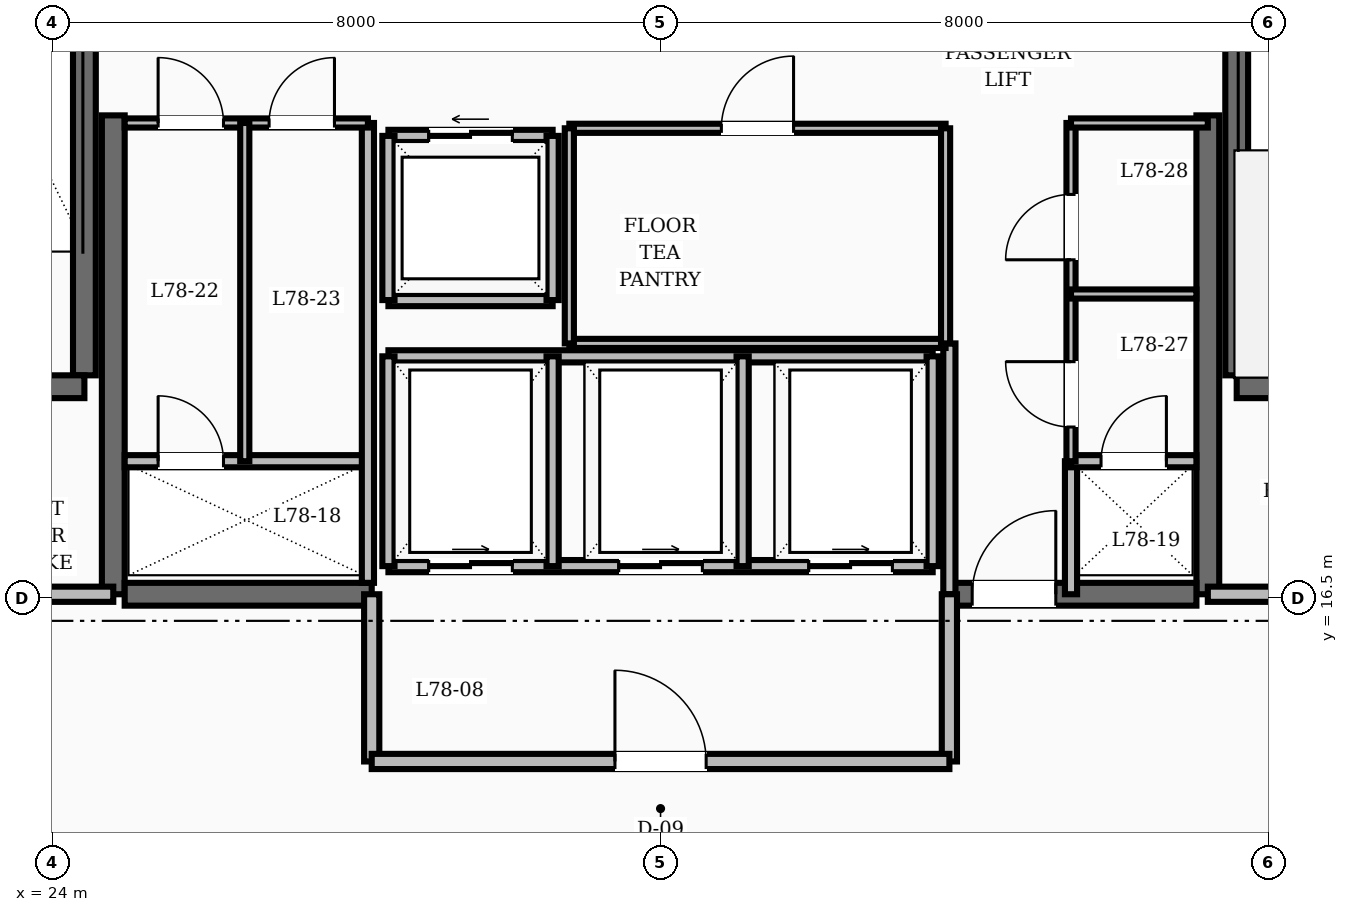
"""IFC4 building model, lengths in metres.
Left out: names, types, materials, properties, quantities, classifications, styles, units other than length and angle.
Written with IfcOpenShell. Run it as: python <this file> out.ifc"""

import sys

from ifc_helpers import new_model, si_unit, direction, frame, frame_2d, origin, place, context, subcontext, project, spatial, rectangle, extrude, element, fill, save


model = new_model("IFC4")
c1 = context("Model", 3, precision=1e-05, world=origin(), true_north=direction((0.0, 1.0)))
c2 = subcontext(c1, "Body", "Model", "MODEL_VIEW")
j1 = project(units=[si_unit("LENGTHUNIT", "METRE"), si_unit("PLANEANGLEUNIT", "RADIAN")], contexts=[c1])
p1 = place(None, origin())
s1 = spatial("IfcSite", under=j1, at=p1, CompositionType="ELEMENT")
p2 = place(p1, origin())
s2 = spatial("IfcBuilding", under=s1, at=p2, CompositionType="ELEMENT")
p3 = place(p2, frame((0.0, 0.0, 297.6)))
s3 = spatial("IfcBuildingStorey", under=s2, at=p3, CompositionType="ELEMENT", Elevation=297.6)
for number, where, z_axis, x_axis in (
    (1, (24.8, 16.55, 0.0), (0.0, 0.0, 1.0), (0.0, 1.0, 0.0)),
    (2, (39.2, 16.55, 0.0), (0.0, 0.0, 1.0), (0.0, 1.0, 0.0)),
):
    element("IfcWall", number, at=place(p3, frame(where, z_axis=z_axis, x_axis=x_axis)), inside=s3, PredefinedType="SHEAR", context=c2, shape_type="SweptSolid", body=[
        extrude(rectangle(XDim=6.3, YDim=0.3, at=frame_2d((3.15, 0.0))), origin(), (0.0, 0.0, 1.0), 4.8),
    ])
p4 = place(p3, frame((24.95, 16.55, 0.0), z_axis=(0.0, 0.0, 1.0), x_axis=(1.0, 0.0, 0.0)))
e3 = element("IfcWall", 3, at=p4, inside=s3, PredefinedType="SHEAR", context=c2, shape_type="SweptSolid", body=[
    extrude(rectangle(XDim=3.25, YDim=0.3, at=frame_2d((1.625, 0.0))), origin(), (0.0, 0.0, 1.0), 4.8),
])
p5 = place(p3, frame((35.8, 16.55, 0.0), z_axis=(0.0, 0.0, 1.0), x_axis=(1.0, 0.0, 0.0)))
e4 = element("IfcWall", 4, at=p5, inside=s3, PredefinedType="SHEAR", context=c2, shape_type="SweptSolid", body=[
    extrude(rectangle(XDim=3.25, YDim=0.3, at=frame_2d((1.625, 0.0))), origin(), (0.0, 0.0, 1.0), 4.8),
])
p6 = place(p5, frame((0.3, 0.0, 0.0)))
e5 = element("IfcOpeningElement", 5, at=p6, cuts=e4, PredefinedType="OPENING", context=c2, shape_type="SweptSolid", body=[
    extrude(rectangle(XDim=1.1, YDim=2.1, at=frame_2d((0.55, 1.05))), frame((0.0, 0.16, 0.0), z_axis=(0.0, -1.0, 0.0), x_axis=(1.0, 0.0, 0.0)), (0.0, 0.0, 1.0), 0.32),
])
p7 = place(p3, frame((24.42, 19.43, 0.0), z_axis=(0.0, 0.0, 1.0), x_axis=(0.0, 1.0, 0.0)))
e6 = element("IfcWall", 6, at=p7, inside=s3, PredefinedType="SHEAR", context=c2, shape_type="SweptSolid", body=[
    extrude(rectangle(XDim=8.74, YDim=0.3, at=frame_2d((4.37, 0.0))), origin(), (0.0, 0.0, 1.0), 4.8),
])
p8 = place(p3, frame((20.82, 19.28, 0.0), z_axis=(0.0, 0.0, 1.0), x_axis=(1.0, 0.0, 0.0)))
e7 = element("IfcWall", 7, at=p8, inside=s3, PredefinedType="SHEAR", context=c2, shape_type="SweptSolid", body=[
    extrude(rectangle(XDim=3.6, YDim=0.3, at=frame_2d((1.8, 0.0))), origin(), (0.0, 0.0, 1.0), 4.8),
])
p9 = place(p8, frame((1.3, 0.0, 0.0)))
e8 = element("IfcOpeningElement", 8, at=p9, cuts=e7, PredefinedType="OPENING", context=c2, shape_type="SweptSolid", body=[
    extrude(rectangle(XDim=1.1, YDim=2.1, at=frame_2d((0.55, 1.05))), frame((0.0, 0.16, 0.0), z_axis=(0.0, -1.0, 0.0), x_axis=(1.0, 0.0, 0.0)), (0.0, 0.0, 1.0), 0.32),
])
p10 = place(p3, frame((39.58, 19.43, 0.0), z_axis=(0.0, 0.0, 1.0), x_axis=(0.0, 1.0, 0.0)))
e9 = element("IfcWall", 9, at=p10, inside=s3, PredefinedType="SHEAR", context=c2, shape_type="SweptSolid", body=[
    extrude(rectangle(XDim=8.74, YDim=0.3, at=frame_2d((4.37, 0.0))), origin(), (0.0, 0.0, 1.0), 4.8),
])
p11 = place(p3, frame((39.58, 19.28, 0.0), z_axis=(0.0, 0.0, 1.0), x_axis=(1.0, 0.0, 0.0)))
e10 = element("IfcWall", 10, at=p11, inside=s3, PredefinedType="SHEAR", context=c2, shape_type="SweptSolid", body=[
    extrude(rectangle(XDim=3.6, YDim=0.3, at=frame_2d((1.8, 0.0))), origin(), (0.0, 0.0, 1.0), 4.8),
])
for number, where, z_axis, x_axis in (
    (11, (20.82, 16.55, 0.0), (0.0, 0.0, 1.0), (1.0, 0.0, 0.0)),
    (12, (39.2, 16.55, 0.0), (0.0, 0.0, 1.0), (1.0, 0.0, 0.0)),
):
    element("IfcWall", number, at=place(p3, frame(where, z_axis=z_axis, x_axis=x_axis)), inside=s3, PredefinedType="SOLIDWALL", context=c2, shape_type="SweptSolid", body=[
        extrude(rectangle(XDim=3.98, YDim=0.2, at=frame_2d((1.99, 0.0))), origin(), (0.0, 0.0, 1.0), 3.71),
    ])
p12 = place(p3, frame((35.8, 16.55, 0.0), z_axis=(0.0, 0.0, 1.0), x_axis=(0.0, 1.0, 0.0)))
e13 = element("IfcWall", 13, at=p12, inside=s3, PredefinedType="SOLIDWALL", context=c2, shape_type="SweptSolid", body=[
    extrude(rectangle(XDim=3.3, YDim=0.16, at=frame_2d((1.65, 0.0))), origin(), (0.0, 0.0, 1.0), 3.71),
])
p13 = place(p3, frame((37.4, 16.55, 0.0), z_axis=(0.0, 0.0, 1.0), x_axis=(0.0, 1.0, 0.0)))
e14 = element("IfcWall", 14, at=p13, inside=s3, PredefinedType="SOLIDWALL", context=c2, shape_type="SweptSolid", body=[
    extrude(rectangle(XDim=1.75, YDim=0.16, at=frame_2d((0.875, 0.0))), origin(), (0.0, 0.0, 1.0), 3.71),
])
for number, where, z_axis, x_axis in (
    (15, (28.2, 14.35, 0.0), (0.0, 0.0, 1.0), (0.0, 1.0, 0.0)),
    (16, (35.8, 14.35, 0.0), (0.0, 0.0, 1.0), (0.0, 1.0, 0.0)),
):
    element("IfcWall", number, at=place(p3, frame(where, z_axis=z_axis, x_axis=x_axis)), inside=s3, PredefinedType="SOLIDWALL", context=c2, shape_type="SweptSolid", body=[
        extrude(rectangle(XDim=2.2, YDim=0.2, at=frame_2d((1.1, 0.0))), origin(), (0.0, 0.0, 1.0), 3.71),
    ])
p14 = place(p3, frame((28.2, 14.35, 0.0), z_axis=(0.0, 0.0, 1.0), x_axis=(1.0, 0.0, 0.0)))
e17 = element("IfcWall", 17, at=p14, inside=s3, PredefinedType="SOLIDWALL", context=c2, shape_type="SweptSolid", body=[
    extrude(rectangle(XDim=7.6, YDim=0.2, at=frame_2d((3.8, 0.0))), origin(), (0.0, 0.0, 1.0), 3.71),
])
p15 = place(p14, frame((3.2, 0.0, 0.0)))
e18 = element("IfcOpeningElement", 18, at=p15, cuts=e17, PredefinedType="OPENING", context=c2, shape_type="SweptSolid", body=[
    extrude(rectangle(XDim=1.2, YDim=2.1, at=frame_2d((0.6, 1.05))), frame((0.0, 0.11, 0.0), z_axis=(0.0, -1.0, 0.0), x_axis=(1.0, 0.0, 0.0)), (0.0, 0.0, 1.0), 0.22),
])
p16 = place(p3, frame((28.42, 22.58, 0.0), z_axis=(0.0, 0.0, 1.0), x_axis=(1.0, 0.0, 0.0)))
e19 = element("IfcWall", 19, at=p16, inside=s3, PredefinedType="SOLIDWALL", context=c2, shape_type="SweptSolid", body=[
    extrude(rectangle(XDim=2.16, YDim=0.16, at=frame_2d((1.08, 0.0))), origin(), (0.0, 0.0, 1.0), 3.71),
])
p17 = place(p16, frame((0.53, 0.0, 0.0)))
e20 = element("IfcOpeningElement", 20, at=p17, cuts=e19, PredefinedType="OPENING", context=c2, shape_type="SweptSolid", body=[
    extrude(rectangle(XDim=1.1, YDim=2.15, at=frame_2d((0.55, 1.075))), frame((0.0, 0.09, 0.0), z_axis=(0.0, -1.0, 0.0), x_axis=(1.0, 0.0, 0.0)), (0.0, 0.0, 1.0), 0.18),
])
for number, where, z_axis, x_axis in (
    (21, (28.42, 20.42, 0.0), (0.0, 0.0, 1.0), (1.0, 0.0, 0.0)),
    (22, (28.42, 20.42, 0.0), (0.0, 0.0, 1.0), (0.0, 1.0, 0.0)),
    (23, (30.58, 20.42, 0.0), (0.0, 0.0, 1.0), (0.0, 1.0, 0.0)),
):
    element("IfcWall", number, at=place(p3, frame(where, z_axis=z_axis, x_axis=x_axis)), inside=s3, PredefinedType="SOLIDWALL", context=c2, shape_type="SweptSolid", body=[
        extrude(rectangle(XDim=2.16, YDim=0.16, at=frame_2d((1.08, 0.0))), origin(), (0.0, 0.0, 1.0), 3.71),
    ])
p18 = place(p3, frame((28.42, 16.92, 0.0), z_axis=(0.0, 0.0, 1.0), x_axis=(1.0, 0.0, 0.0)))
e24 = element("IfcWall", 24, at=p18, inside=s3, PredefinedType="SOLIDWALL", context=c2, shape_type="SweptSolid", body=[
    extrude(rectangle(XDim=7.16, YDim=0.16, at=frame_2d((3.58, 0.0))), origin(), (0.0, 0.0, 1.0), 3.71),
])
p19 = place(p18, frame((0.53, 0.0, 0.0)))
e25 = element("IfcOpeningElement", 25, at=p19, cuts=e24, PredefinedType="OPENING", context=c2, shape_type="SweptSolid", body=[
    extrude(rectangle(XDim=1.1, YDim=2.15, at=frame_2d((0.55, 1.075))), frame((0.0, 0.09, 0.0), z_axis=(0.0, -1.0, 0.0), x_axis=(1.0, 0.0, 0.0)), (0.0, 0.0, 1.0), 0.18),
])
p20 = place(p18, frame((3.03, 0.0, 0.0)))
e26 = element("IfcOpeningElement", 26, at=p20, cuts=e24, PredefinedType="OPENING", context=c2, shape_type="SweptSolid", body=[
    extrude(rectangle(XDim=1.1, YDim=2.15, at=frame_2d((0.55, 1.075))), frame((0.0, 0.09, 0.0), z_axis=(0.0, -1.0, 0.0), x_axis=(1.0, 0.0, 0.0)), (0.0, 0.0, 1.0), 0.18),
])
p21 = place(p18, frame((5.53, 0.0, 0.0)))
e27 = element("IfcOpeningElement", 27, at=p21, cuts=e24, PredefinedType="OPENING", context=c2, shape_type="SweptSolid", body=[
    extrude(rectangle(XDim=1.1, YDim=2.15, at=frame_2d((0.55, 1.075))), frame((0.0, 0.09, 0.0), z_axis=(0.0, -1.0, 0.0), x_axis=(1.0, 0.0, 0.0)), (0.0, 0.0, 1.0), 0.18),
])
p22 = place(p3, frame((28.42, 19.68, 0.0), z_axis=(0.0, 0.0, 1.0), x_axis=(1.0, 0.0, 0.0)))
e28 = element("IfcWall", 28, at=p22, inside=s3, PredefinedType="SOLIDWALL", context=c2, shape_type="SweptSolid", body=[
    extrude(rectangle(XDim=7.16, YDim=0.16, at=frame_2d((3.58, 0.0))), origin(), (0.0, 0.0, 1.0), 3.71),
])
for number, where, z_axis, x_axis in (
    (29, (28.42, 16.92, 0.0), (0.0, 0.0, 1.0), (0.0, 1.0, 0.0)),
    (30, (30.58, 16.92, 0.0), (0.0, 0.0, 1.0), (0.0, 1.0, 0.0)),
    (31, (33.08, 16.92, 0.0), (0.0, 0.0, 1.0), (0.0, 1.0, 0.0)),
    (32, (35.58, 16.92, 0.0), (0.0, 0.0, 1.0), (0.0, 1.0, 0.0)),
):
    element("IfcWall", number, at=place(p3, frame(where, z_axis=z_axis, x_axis=x_axis)), inside=s3, PredefinedType="SOLIDWALL", context=c2, shape_type="SweptSolid", body=[
        extrude(rectangle(XDim=2.76, YDim=0.16, at=frame_2d((1.38, 0.0))), origin(), (0.0, 0.0, 1.0), 3.71),
    ])
p23 = place(p3, frame((30.8, 22.68, 0.0), z_axis=(0.0, 0.0, 1.0), x_axis=(1.0, 0.0, 0.0)))
e33 = element("IfcWall", 33, at=p23, inside=s3, PredefinedType="PARTITIONING", context=c2, shape_type="SweptSolid", body=[
    extrude(rectangle(XDim=4.95, YDim=0.12, at=frame_2d((2.475, 0.0))), origin(), (0.0, 0.0, 1.0), 3.71),
])
p24 = place(p23, frame((2.0, 0.0, 0.0)))
e34 = element("IfcOpeningElement", 34, at=p24, cuts=e33, PredefinedType="OPENING", context=c2, shape_type="SweptSolid", body=[
    extrude(rectangle(XDim=0.95, YDim=2.1, at=frame_2d((0.475, 1.05))), frame((0.0, 0.07, 0.0), z_axis=(0.0, -1.0, 0.0), x_axis=(1.0, 0.0, 0.0)), (0.0, 0.0, 1.0), 0.14),
])
p25 = place(p3, frame((30.8, 19.85, 0.0), z_axis=(0.0, 0.0, 1.0), x_axis=(1.0, 0.0, 0.0)))
e35 = element("IfcWall", 35, at=p25, inside=s3, PredefinedType="PARTITIONING", context=c2, shape_type="SweptSolid", body=[
    extrude(rectangle(XDim=4.95, YDim=0.12, at=frame_2d((2.475, 0.0))), origin(), (0.0, 0.0, 1.0), 3.71),
])
for number, where, z_axis, x_axis in (
    (36, (30.8, 19.85, 0.0), (0.0, 0.0, 1.0), (0.0, 1.0, 0.0)),
    (37, (35.75, 19.85, 0.0), (0.0, 0.0, 1.0), (0.0, 1.0, 0.0)),
):
    element("IfcWall", number, at=place(p3, frame(where, z_axis=z_axis, x_axis=x_axis)), inside=s3, PredefinedType="PARTITIONING", context=c2, shape_type="SweptSolid", body=[
        extrude(rectangle(XDim=2.83, YDim=0.12, at=frame_2d((1.415, 0.0))), origin(), (0.0, 0.0, 1.0), 3.71),
    ])
p26 = place(p3, frame((24.95, 18.3, 0.0), z_axis=(0.0, 0.0, 1.0), x_axis=(1.0, 0.0, 0.0)))
e38 = element("IfcWall", 38, at=p26, inside=s3, PredefinedType="SOLIDWALL", context=c2, shape_type="SweptSolid", body=[
    extrude(rectangle(XDim=3.2, YDim=0.16, at=frame_2d((1.6, 0.0))), origin(), (0.0, 0.0, 1.0), 3.71),
])
p27 = place(p26, frame((0.44, 0.0, 0.0)))
e39 = element("IfcOpeningElement", 39, at=p27, cuts=e38, PredefinedType="OPENING", context=c2, shape_type="SweptSolid", body=[
    extrude(rectangle(XDim=0.86, YDim=2.05, at=frame_2d((0.43, 1.025))), frame((0.0, 0.09, 0.0), z_axis=(0.0, -1.0, 0.0), x_axis=(1.0, 0.0, 0.0)), (0.0, 0.0, 1.0), 0.18),
])
p28 = place(p3, frame((28.15, 16.7, 0.0), z_axis=(0.0, 0.0, 1.0), x_axis=(0.0, 1.0, 0.0)))
e40 = element("IfcWall", 40, at=p28, inside=s3, PredefinedType="SOLIDWALL", context=c2, shape_type="SweptSolid", body=[
    extrude(rectangle(XDim=6.05, YDim=0.16, at=frame_2d((3.025, 0.0))), origin(), (0.0, 0.0, 1.0), 3.71),
])
p29 = place(p3, frame((37.4, 18.3, 0.0), z_axis=(0.0, 0.0, 1.0), x_axis=(1.0, 0.0, 0.0)))
e41 = element("IfcWall", 41, at=p29, inside=s3, PredefinedType="SOLIDWALL", context=c2, shape_type="SweptSolid", body=[
    extrude(rectangle(XDim=1.65, YDim=0.16, at=frame_2d((0.825, 0.0))), origin(), (0.0, 0.0, 1.0), 3.71),
])
p30 = place(p29, frame((0.395, 0.0, 0.0)))
e42 = element("IfcOpeningElement", 42, at=p30, cuts=e41, PredefinedType="OPENING", context=c2, shape_type="SweptSolid", body=[
    extrude(rectangle(XDim=0.86, YDim=2.1, at=frame_2d((0.43, 1.05))), frame((0.0, 0.09, 0.0), z_axis=(0.0, -1.0, 0.0), x_axis=(1.0, 0.0, 0.0)), (0.0, 0.0, 1.0), 0.18),
])
p31 = place(p3, frame((24.95, 22.75, 0.0), z_axis=(0.0, 0.0, 1.0), x_axis=(1.0, 0.0, 0.0)))
e43 = element("IfcWall", 43, at=p31, inside=s3, PredefinedType="PARTITIONING", context=c2, shape_type="SweptSolid", body=[
    extrude(rectangle(XDim=3.2, YDim=0.12, at=frame_2d((1.6, 0.0))), origin(), (0.0, 0.0, 1.0), 3.71),
])
p32 = place(p31, frame((0.44, 0.0, 0.0)))
e44 = element("IfcOpeningElement", 44, at=p32, cuts=e43, PredefinedType="OPENING", context=c2, shape_type="SweptSolid", body=[
    extrude(rectangle(XDim=0.86, YDim=2.1, at=frame_2d((0.43, 1.05))), frame((0.0, 0.07, 0.0), z_axis=(0.0, -1.0, 0.0), x_axis=(1.0, 0.0, 0.0)), (0.0, 0.0, 1.0), 0.14),
])
p33 = place(p31, frame((1.9, 0.0, 0.0)))
e45 = element("IfcOpeningElement", 45, at=p33, cuts=e43, PredefinedType="OPENING", context=c2, shape_type="SweptSolid", body=[
    extrude(rectangle(XDim=0.86, YDim=2.1, at=frame_2d((0.43, 1.05))), frame((0.0, 0.07, 0.0), z_axis=(0.0, -1.0, 0.0), x_axis=(1.0, 0.0, 0.0)), (0.0, 0.0, 1.0), 0.14),
])
p34 = place(p3, frame((37.4, 18.3, 0.0), z_axis=(0.0, 0.0, 1.0), x_axis=(0.0, 1.0, 0.0)))
e46 = element("IfcWall", 46, at=p34, inside=s3, PredefinedType="PARTITIONING", context=c2, shape_type="SweptSolid", body=[
    extrude(rectangle(XDim=4.45, YDim=0.12, at=frame_2d((2.225, 0.0))), origin(), (0.0, 0.0, 1.0), 3.71),
])
p35 = place(p34, frame((0.45, 0.0, 0.0)))
e47 = element("IfcOpeningElement", 47, at=p35, cuts=e46, PredefinedType="OPENING", context=c2, shape_type="SweptSolid", body=[
    extrude(rectangle(XDim=0.86, YDim=2.1, at=frame_2d((0.43, 1.05))), frame((0.0, 0.07, 0.0), z_axis=(0.0, -1.0, 0.0), x_axis=(1.0, 0.0, 0.0)), (0.0, 0.0, 1.0), 0.14),
])
p36 = place(p34, frame((2.65, 0.0, 0.0)))
e48 = element("IfcOpeningElement", 48, at=p36, cuts=e46, PredefinedType="OPENING", context=c2, shape_type="SweptSolid", body=[
    extrude(rectangle(XDim=0.86, YDim=2.1, at=frame_2d((0.43, 1.05))), frame((0.0, 0.07, 0.0), z_axis=(0.0, -1.0, 0.0), x_axis=(1.0, 0.0, 0.0)), (0.0, 0.0, 1.0), 0.14),
])
p37 = place(p3, frame((37.4, 22.75, 0.0), z_axis=(0.0, 0.0, 1.0), x_axis=(1.0, 0.0, 0.0)))
e49 = element("IfcWall", 49, at=p37, inside=s3, PredefinedType="PARTITIONING", context=c2, shape_type="SweptSolid", body=[
    extrude(rectangle(XDim=1.8, YDim=0.12, at=frame_2d((0.9, 0.0))), origin(), (0.0, 0.0, 1.0), 3.71),
])
p38 = place(p3, frame((26.53, 18.3, 0.0), z_axis=(0.0, 0.0, 1.0), x_axis=(0.0, 1.0, 0.0)))
e50 = element("IfcWall", 50, at=p38, inside=s3, PredefinedType="PARTITIONING", context=c2, shape_type="SweptSolid", body=[
    extrude(rectangle(XDim=4.45, YDim=0.12, at=frame_2d((2.225, 0.0))), origin(), (0.0, 0.0, 1.0), 3.71),
])
p39 = place(p3, frame((37.4, 20.5, 0.0), z_axis=(0.0, 0.0, 1.0), x_axis=(1.0, 0.0, 0.0)))
e51 = element("IfcWall", 51, at=p39, inside=s3, PredefinedType="PARTITIONING", context=c2, shape_type="SweptSolid", body=[
    extrude(rectangle(XDim=1.65, YDim=0.12, at=frame_2d((0.825, 0.0))), origin(), (0.0, 0.0, 1.0), 3.71),
])
p40 = place(p6, origin())
e52 = element("IfcDoor", 52, at=p40, inside=s3, OperationType="SINGLE_SWING_RIGHT", PredefinedType="DOOR", context=c2, shape_type="SweptSolid", body=[
    extrude(rectangle(XDim=1.1, YDim=2.1, at=frame_2d((0.55, 1.05))), frame((0.0, 0.025, 0.0), z_axis=(0.0, -1.0, 0.0), x_axis=(1.0, 0.0, 0.0)), (0.0, 0.0, 1.0), 0.05),
])
fill(e5, e52)
p41 = place(p15, origin())
e53 = element("IfcDoor", 53, at=p41, inside=s3, OperationType="SINGLE_SWING_LEFT", PredefinedType="DOOR", context=c2, shape_type="SweptSolid", body=[
    extrude(rectangle(XDim=1.2, YDim=2.1, at=frame_2d((0.6, 1.05))), frame((0.0, 0.025, 0.0), z_axis=(0.0, -1.0, 0.0), x_axis=(1.0, 0.0, 0.0)), (0.0, 0.0, 1.0), 0.05),
])
fill(e18, e53)
p42 = place(p17, origin())
e54 = element("IfcDoor", 54, at=p42, inside=s3, OperationType="SLIDING_TO_LEFT", PredefinedType="DOOR", context=c2, shape_type="SweptSolid", body=[
    extrude(rectangle(XDim=1.1, YDim=2.15, at=frame_2d((0.55, 1.075))), frame((0.0, 0.025, 0.0), z_axis=(0.0, -1.0, 0.0), x_axis=(1.0, 0.0, 0.0)), (0.0, 0.0, 1.0), 0.05),
])
fill(e20, e54)
p43 = place(p19, origin())
e55 = element("IfcDoor", 55, at=p43, inside=s3, OperationType="SLIDING_TO_RIGHT", PredefinedType="DOOR", context=c2, shape_type="SweptSolid", body=[
    extrude(rectangle(XDim=1.1, YDim=2.15, at=frame_2d((0.55, 1.075))), frame((0.0, 0.025, 0.0), z_axis=(0.0, -1.0, 0.0), x_axis=(1.0, 0.0, 0.0)), (0.0, 0.0, 1.0), 0.05),
])
fill(e25, e55)
p44 = place(p20, origin())
e56 = element("IfcDoor", 56, at=p44, inside=s3, OperationType="SLIDING_TO_RIGHT", PredefinedType="DOOR", context=c2, shape_type="SweptSolid", body=[
    extrude(rectangle(XDim=1.1, YDim=2.15, at=frame_2d((0.55, 1.075))), frame((0.0, 0.025, 0.0), z_axis=(0.0, -1.0, 0.0), x_axis=(1.0, 0.0, 0.0)), (0.0, 0.0, 1.0), 0.05),
])
fill(e26, e56)
p45 = place(p21, origin())
e57 = element("IfcDoor", 57, at=p45, inside=s3, OperationType="SLIDING_TO_RIGHT", PredefinedType="DOOR", context=c2, shape_type="SweptSolid", body=[
    extrude(rectangle(XDim=1.1, YDim=2.15, at=frame_2d((0.55, 1.075))), frame((0.0, 0.025, 0.0), z_axis=(0.0, -1.0, 0.0), x_axis=(1.0, 0.0, 0.0)), (0.0, 0.0, 1.0), 0.05),
])
fill(e27, e57)
p46 = place(p24, origin())
e58 = element("IfcDoor", 58, at=p46, inside=s3, OperationType="SINGLE_SWING_RIGHT", PredefinedType="DOOR", context=c2, shape_type="SweptSolid", body=[
    extrude(rectangle(XDim=0.95, YDim=2.1, at=frame_2d((0.475, 1.05))), frame((0.0, 0.025, 0.0), z_axis=(0.0, -1.0, 0.0), x_axis=(1.0, 0.0, 0.0)), (0.0, 0.0, 1.0), 0.05),
])
fill(e34, e58)
p47 = place(p27, origin())
e59 = element("IfcDoor", 59, at=p47, inside=s3, OperationType="SINGLE_SWING_LEFT", PredefinedType="TRAPDOOR", context=c2, shape_type="SweptSolid", body=[
    extrude(rectangle(XDim=0.86, YDim=2.05, at=frame_2d((0.43, 1.025))), frame((0.0, 0.025, 0.0), z_axis=(0.0, -1.0, 0.0), x_axis=(1.0, 0.0, 0.0)), (0.0, 0.0, 1.0), 0.05),
])
fill(e39, e59)
p48 = place(p30, origin())
e60 = element("IfcDoor", 60, at=p48, inside=s3, OperationType="SINGLE_SWING_RIGHT", PredefinedType="TRAPDOOR", context=c2, shape_type="SweptSolid", body=[
    extrude(rectangle(XDim=0.86, YDim=2.1, at=frame_2d((0.43, 1.05))), frame((0.0, 0.025, 0.0), z_axis=(0.0, -1.0, 0.0), x_axis=(1.0, 0.0, 0.0)), (0.0, 0.0, 1.0), 0.05),
])
fill(e42, e60)
p49 = place(p32, origin())
e61 = element("IfcDoor", 61, at=p49, inside=s3, OperationType="SINGLE_SWING_LEFT", PredefinedType="DOOR", context=c2, shape_type="SweptSolid", body=[
    extrude(rectangle(XDim=0.86, YDim=2.1, at=frame_2d((0.43, 1.05))), frame((0.0, 0.025, 0.0), z_axis=(0.0, -1.0, 0.0), x_axis=(1.0, 0.0, 0.0)), (0.0, 0.0, 1.0), 0.05),
])
fill(e44, e61)
p50 = place(p33, origin())
e62 = element("IfcDoor", 62, at=p50, inside=s3, OperationType="SINGLE_SWING_RIGHT", PredefinedType="DOOR", context=c2, shape_type="SweptSolid", body=[
    extrude(rectangle(XDim=0.86, YDim=2.1, at=frame_2d((0.43, 1.05))), frame((0.0, 0.025, 0.0), z_axis=(0.0, -1.0, 0.0), x_axis=(1.0, 0.0, 0.0)), (0.0, 0.0, 1.0), 0.05),
])
fill(e45, e62)
p51 = place(p35, origin())
e63 = element("IfcDoor", 63, at=p51, inside=s3, OperationType="SINGLE_SWING_RIGHT", PredefinedType="DOOR", context=c2, shape_type="SweptSolid", body=[
    extrude(rectangle(XDim=0.86, YDim=2.1, at=frame_2d((0.43, 1.05))), frame((0.0, 0.025, 0.0), z_axis=(0.0, -1.0, 0.0), x_axis=(1.0, 0.0, 0.0)), (0.0, 0.0, 1.0), 0.05),
])
fill(e47, e63)
p52 = place(p36, origin())
e64 = element("IfcDoor", 64, at=p52, inside=s3, OperationType="SINGLE_SWING_LEFT", PredefinedType="DOOR", context=c2, shape_type="SweptSolid", body=[
    extrude(rectangle(XDim=0.86, YDim=2.1, at=frame_2d((0.43, 1.05))), frame((0.0, 0.025, 0.0), z_axis=(0.0, -1.0, 0.0), x_axis=(1.0, 0.0, 0.0)), (0.0, 0.0, 1.0), 0.05),
])
fill(e48, e64)
save(model, sys.argv[1])
